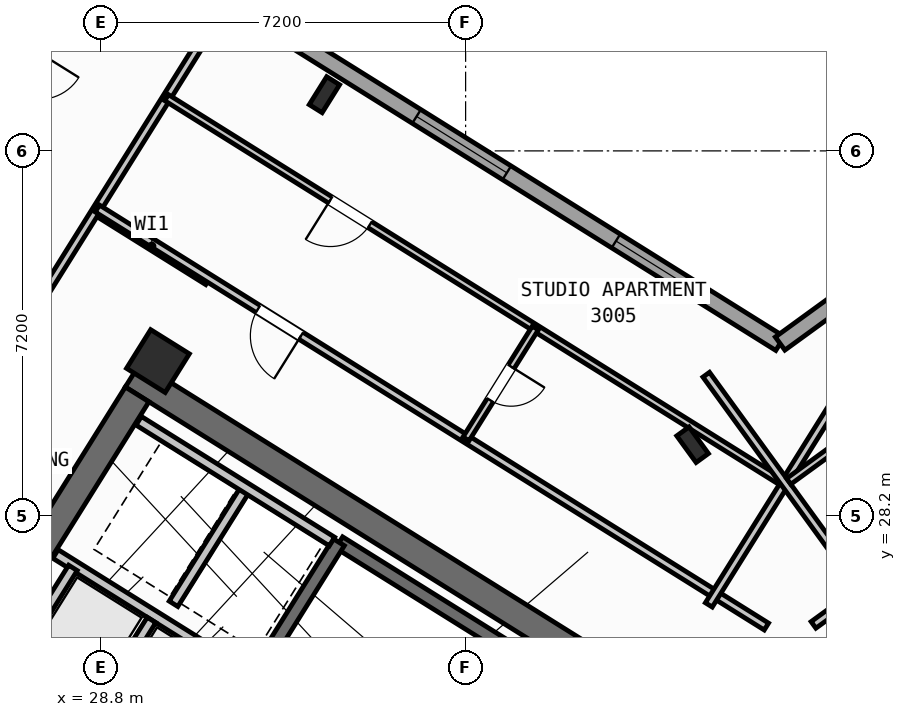
"""IFC4 building model, lengths in metres.
Left out: names, types, materials, properties, quantities, classifications, styles, units other than length and angle.
Written with IfcOpenShell. Run it as: python <this file> out.ifc"""

import sys

from ifc_helpers import new_model, si_unit, direction, frame, frame_2d, origin, origin_2d, place, context, subcontext, project, spatial, rectangle, hollow_rectangle, i_section, extrude, source, transform, mapped, element, fill, save


model = new_model("IFC4")
c1 = context("Model", 3, precision=1e-05, world=origin(), true_north=direction((0.0, 1.0)))
c2 = subcontext(c1, "Body", "Model", "MODEL_VIEW")
j1 = project(units=[si_unit("LENGTHUNIT", "METRE"), si_unit("PLANEANGLEUNIT", "RADIAN")], contexts=[c1])
p1 = place(None, origin())
s1 = spatial("IfcSite", under=j1, at=p1, CompositionType="ELEMENT")
p2 = place(p1, origin())
s2 = spatial("IfcBuilding", under=s1, at=p2, CompositionType="ELEMENT")
p3 = place(p2, frame((0.0, 0.0, 119.7)))
s3 = spatial("IfcBuildingStorey", under=s2, at=p3, CompositionType="ELEMENT", Elevation=119.7)
p4 = place(p3, frame((40.573, 24.01, 0.0), z_axis=(0.0, 0.0, 1.0), x_axis=(-0.848047359947, 0.529920442413, 0.0)))
e1 = element("IfcWall", 1, at=p4, inside=s3, PredefinedType="SHEAR", context=c2, shape_type="SweptSolid", body=[
    extrude(rectangle(XDim=13.14, YDim=0.55, at=frame_2d((6.57, 0.0))), origin(), (0.0, 0.0, 1.0), 3.35),
])
p5 = place(p3, frame((29.517, 30.594, 0.0), z_axis=(0.0, 0.0, 1.0), x_axis=(-0.529906864564, -0.848055844204, 0.0)))
e2 = element("IfcWall", 2, at=p5, inside=s3, PredefinedType="SHEAR", context=c2, shape_type="SweptSolid", body=[
    extrude(rectangle(XDim=3.575, YDim=0.55, at=frame_2d((1.788, 0.0))), origin(), (0.0, 0.0, 1.0), 3.35),
])
m1 = source(origin(), c2, "Body", "SweptSolid", [
    extrude(i_section(OverallWidth=0.3, OverallDepth=0.65, WebThickness=0.016, FlangeThickness=0.031, at=origin_2d()), origin(), (0.0, 0.0, 1.0), 3.6),
])
p6 = place(p3, frame((33.213, 36.509, 0.0), z_axis=(0.0, 0.0, 1.0), x_axis=(-0.848048096156, 0.529919264233, 0.0)))
e3 = element("IfcColumn", 3, at=p6, inside=s3, PredefinedType="COLUMN", context=c2, shape_type="MappedRepresentation", body=[
    mapped(m1, transform((0.0, 0.0, 0.0), scale=1.0)),
])
m2 = source(origin(), c2, "Body", "SweptSolid", [
    extrude(hollow_rectangle(XDim=0.9, YDim=0.9, WallThickness=0.036, at=origin_2d()), origin(), (0.0, 0.0, 1.0), 3.6),
])
p7 = place(p3, frame((29.928, 31.251, 0.0), z_axis=(0.0, 0.0, 1.0), x_axis=(-0.848048096156, 0.529919264233, 0.0)))
e4 = element("IfcColumn", 4, at=p7, inside=s3, PredefinedType="COLUMN", context=c2, shape_type="MappedRepresentation", body=[
    mapped(m2, transform((0.0, 0.0, 0.0), scale=1.0)),
])
p8 = place(p3, frame((40.479, 29.601, 0.0), z_axis=(0.0, 0.0, 1.0), x_axis=(0.809016994375, 0.587785252292, 0.0)))
e5 = element("IfcColumn", 5, at=p8, inside=s3, PredefinedType="COLUMN", context=c2, shape_type="MappedRepresentation", body=[
    mapped(m1, transform((0.0, 0.0, 0.0), scale=1.0)),
])
p9 = place(p3, frame((31.76, 12.183, 0.0), z_axis=(0.0, 0.0, 1.0), x_axis=(-0.848047074256, 0.529920899612, 0.0)))
e6 = element("IfcWall", 6, at=p9, inside=s3, PredefinedType="STANDARD", context=c2, shape_type="SweptSolid", body=[
    extrude(rectangle(XDim=30.652, YDim=0.32, at=frame_2d((15.326, 0.0))), origin(), (0.0, 0.0, 1.0), 3.35),
])
p10 = place(p9, frame((15.153, 0.0, 0.0)))
e7 = element("IfcOpeningElement", 7, at=p10, cuts=e6, PredefinedType="OPENING", context=c2, shape_type="SweptSolid", body=[
    extrude(rectangle(XDim=1.2, YDim=2.15, at=frame_2d((0.6, 1.075))), frame((0.0, 0.17, 0.0), z_axis=(0.0, -1.0, 0.0), x_axis=(1.0, 0.0, 0.0)), (0.0, 0.0, 1.0), 0.34),
])
p11 = place(p9, frame((2.002, 0.0, 0.8)))
e8 = element("IfcOpeningElement", 8, at=p11, cuts=e6, PredefinedType="OPENING", context=c2, shape_type="SweptSolid", body=[
    extrude(rectangle(XDim=2.1, YDim=1.55, at=frame_2d((1.05, 0.775))), frame((0.0, 0.17, 0.0), z_axis=(0.0, -1.0, 0.0), x_axis=(1.0, 0.0, 0.0)), (0.0, 0.0, 1.0), 0.34),
])
p12 = place(p9, frame((7.206, 0.0, 0.8)))
e9 = element("IfcOpeningElement", 9, at=p12, cuts=e6, PredefinedType="OPENING", context=c2, shape_type="SweptSolid", body=[
    extrude(rectangle(XDim=2.1, YDim=1.55, at=frame_2d((1.05, 0.775))), frame((0.0, 0.17, 0.0), z_axis=(0.0, -1.0, 0.0), x_axis=(1.0, 0.0, 0.0)), (0.0, 0.0, 1.0), 0.34),
])
p13 = place(p9, frame((12.648, 0.0, 1.0)))
e10 = element("IfcOpeningElement", 10, at=p13, cuts=e6, PredefinedType="OPENING", context=c2, shape_type="SweptSolid", body=[
    extrude(rectangle(XDim=0.9, YDim=1.25, at=frame_2d((0.45, 0.625))), frame((0.0, 0.17, 0.0), z_axis=(0.0, -1.0, 0.0), x_axis=(1.0, 0.0, 0.0)), (0.0, 0.0, 1.0), 0.34),
])
p14 = place(p9, frame((19.458, 0.0, 0.95)))
e11 = element("IfcOpeningElement", 11, at=p14, cuts=e6, PredefinedType="OPENING", context=c2, shape_type="SweptSolid", body=[
    extrude(rectangle(XDim=1.2, YDim=1.4, at=frame_2d((0.6, 0.7))), frame((0.0, 0.17, 0.0), z_axis=(0.0, -1.0, 0.0), x_axis=(1.0, 0.0, 0.0)), (0.0, 0.0, 1.0), 0.34),
])
p15 = place(p9, frame((21.858, 0.0, 0.95)))
e12 = element("IfcOpeningElement", 12, at=p15, cuts=e6, PredefinedType="OPENING", context=c2, shape_type="SweptSolid", body=[
    extrude(rectangle(XDim=1.2, YDim=1.4, at=frame_2d((0.6, 0.7))), frame((0.0, 0.17, 0.0), z_axis=(0.0, -1.0, 0.0), x_axis=(1.0, 0.0, 0.0)), (0.0, 0.0, 1.0), 0.34),
])
p16 = place(p9, frame((27.266, 0.0, 0.8)))
e13 = element("IfcOpeningElement", 13, at=p16, cuts=e6, PredefinedType="OPENING", context=c2, shape_type="SweptSolid", body=[
    extrude(rectangle(XDim=2.1, YDim=1.55, at=frame_2d((1.05, 0.775))), frame((0.0, 0.17, 0.0), z_axis=(0.0, -1.0, 0.0), x_axis=(1.0, 0.0, 0.0)), (0.0, 0.0, 1.0), 0.34),
])
p17 = place(p3, frame((17.424, 47.083, 0.0), z_axis=(0.0, 0.0, 1.0), x_axis=(0.848049927979, -0.529916332693, 0.0)))
e14 = element("IfcWall", 14, at=p17, inside=s3, PredefinedType="STANDARD", context=c2, shape_type="SweptSolid", body=[
    extrude(rectangle(XDim=29.223, YDim=0.32, at=frame_2d((14.612, 0.0))), origin(), (0.0, 0.0, 1.0), 3.35),
])
p18 = place(p17, frame((8.839, 0.0, 0.0)))
e15 = element("IfcOpeningElement", 15, at=p18, cuts=e14, PredefinedType="OPENING", context=c2, shape_type="SweptSolid", body=[
    extrude(rectangle(XDim=1.05, YDim=2.15, at=frame_2d((0.525, 1.075))), frame((0.0, 0.17, 0.0), z_axis=(0.0, -1.0, 0.0), x_axis=(1.0, 0.0, 0.0)), (0.0, 0.0, 1.0), 0.34),
])
p19 = place(p17, frame((0.719, 0.0, 0.85)))
e16 = element("IfcOpeningElement", 16, at=p19, cuts=e14, PredefinedType="OPENING", context=c2, shape_type="SweptSolid", body=[
    extrude(rectangle(XDim=1.8, YDim=1.5, at=frame_2d((0.9, 0.75))), frame((0.0, 0.17, 0.0), z_axis=(0.0, -1.0, 0.0), x_axis=(1.0, 0.0, 0.0)), (0.0, 0.0, 1.0), 0.34),
])
p20 = place(p17, frame((3.981, 0.0, 0.85)))
e17 = element("IfcOpeningElement", 17, at=p20, cuts=e14, PredefinedType="OPENING", context=c2, shape_type="SweptSolid", body=[
    extrude(rectangle(XDim=1.5, YDim=1.5, at=frame_2d((0.75, 0.75))), frame((0.0, 0.17, 0.0), z_axis=(0.0, -1.0, 0.0), x_axis=(1.0, 0.0, 0.0)), (0.0, 0.0, 1.0), 0.34),
])
p21 = place(p17, frame((7.021, 0.0, 0.95)))
e18 = element("IfcOpeningElement", 18, at=p21, cuts=e14, PredefinedType="OPENING", context=c2, shape_type="SweptSolid", body=[
    extrude(rectangle(XDim=1.2, YDim=1.4, at=frame_2d((0.6, 0.7))), frame((0.0, 0.17, 0.0), z_axis=(0.0, -1.0, 0.0), x_axis=(1.0, 0.0, 0.0)), (0.0, 0.0, 1.0), 0.34),
])
p22 = place(p17, frame((14.471, 0.0, 0.95)))
e19 = element("IfcOpeningElement", 19, at=p22, cuts=e14, PredefinedType="OPENING", context=c2, shape_type="SweptSolid", body=[
    extrude(rectangle(XDim=1.2, YDim=1.4, at=frame_2d((0.6, 0.7))), frame((0.0, 0.17, 0.0), z_axis=(0.0, -1.0, 0.0), x_axis=(1.0, 0.0, 0.0)), (0.0, 0.0, 1.0), 0.34),
])
p23 = place(p17, frame((17.254, 0.0, 1.0)))
e20 = element("IfcOpeningElement", 20, at=p23, cuts=e14, PredefinedType="OPENING", context=c2, shape_type="SweptSolid", body=[
    extrude(rectangle(XDim=0.9, YDim=1.25, at=frame_2d((0.45, 0.625))), frame((0.0, 0.17, 0.0), z_axis=(0.0, -1.0, 0.0), x_axis=(1.0, 0.0, 0.0)), (0.0, 0.0, 1.0), 0.34),
])
p24 = place(p17, frame((20.764, 0.0, 0.8)))
e21 = element("IfcOpeningElement", 21, at=p24, cuts=e14, PredefinedType="OPENING", context=c2, shape_type="SweptSolid", body=[
    extrude(rectangle(XDim=2.1, YDim=1.55, at=frame_2d((1.05, 0.775))), frame((0.0, 0.17, 0.0), z_axis=(0.0, -1.0, 0.0), x_axis=(1.0, 0.0, 0.0)), (0.0, 0.0, 1.0), 0.34),
])
p25 = place(p17, frame((25.403, 0.0, 0.8)))
e22 = element("IfcOpeningElement", 22, at=p25, cuts=e14, PredefinedType="OPENING", context=c2, shape_type="SweptSolid", body=[
    extrude(rectangle(XDim=2.1, YDim=1.55, at=frame_2d((1.05, 0.775))), frame((0.0, 0.17, 0.0), z_axis=(0.0, -1.0, 0.0), x_axis=(1.0, 0.0, 0.0)), (0.0, 0.0, 1.0), 0.34),
])
p26 = place(p3, frame((42.207, 31.597, 0.0), z_axis=(0.0, 0.0, 1.0), x_axis=(0.809020333377, 0.587780656523, 0.0)))
e23 = element("IfcWall", 23, at=p26, inside=s3, PredefinedType="STANDARD", context=c2, shape_type="SweptSolid", body=[
    extrude(rectangle(XDim=15.223, YDim=0.32, at=frame_2d((7.611, 0.0))), origin(), (0.0, 0.0, 1.0), 3.35),
])
p27 = place(p26, frame((12.82, 0.0, 0.0)))
e24 = element("IfcOpeningElement", 24, at=p27, cuts=e23, PredefinedType="OPENING", context=c2, shape_type="SweptSolid", body=[
    extrude(rectangle(XDim=1.05, YDim=2.15, at=frame_2d((0.525, 1.075))), frame((0.0, 0.17, 0.0), z_axis=(0.0, -1.0, 0.0), x_axis=(1.0, 0.0, 0.0)), (0.0, 0.0, 1.0), 0.34),
])
p28 = place(p26, frame((1.52, 0.0, 0.8)))
e25 = element("IfcOpeningElement", 25, at=p28, cuts=e23, PredefinedType="OPENING", context=c2, shape_type="SweptSolid", body=[
    extrude(rectangle(XDim=2.1, YDim=1.55, at=frame_2d((1.05, 0.775))), frame((0.0, 0.17, 0.0), z_axis=(0.0, -1.0, 0.0), x_axis=(1.0, 0.0, 0.0)), (0.0, 0.0, 1.0), 0.34),
])
p29 = place(p26, frame((5.76, 0.0, 0.8)))
e26 = element("IfcOpeningElement", 26, at=p29, cuts=e23, PredefinedType="OPENING", context=c2, shape_type="SweptSolid", body=[
    extrude(rectangle(XDim=2.1, YDim=1.55, at=frame_2d((1.05, 0.775))), frame((0.0, 0.17, 0.0), z_axis=(0.0, -1.0, 0.0), x_axis=(1.0, 0.0, 0.0)), (0.0, 0.0, 1.0), 0.34),
])
p30 = place(p26, frame((10.219, 0.0, 1.0)))
e27 = element("IfcOpeningElement", 27, at=p30, cuts=e23, PredefinedType="OPENING", context=c2, shape_type="SweptSolid", body=[
    extrude(rectangle(XDim=0.9, YDim=1.25, at=frame_2d((0.45, 0.625))), frame((0.0, 0.17, 0.0), z_axis=(0.0, -1.0, 0.0), x_axis=(1.0, 0.0, 0.0)), (0.0, 0.0, 1.0), 0.34),
])
p31 = place(p3, frame((39.721, 23.788, 0.0), z_axis=(0.0, 0.0, 1.0), x_axis=(-0.848054434086, 0.529909121291, 0.0)))
e28 = element("IfcWall", 28, at=p31, inside=s3, PredefinedType="SHEAR", context=c2, shape_type="SweptSolid", body=[
    extrude(rectangle(XDim=7.33, YDim=0.26, at=frame_2d((3.665, 0.0))), origin(), (0.0, 0.0, 1.0), 3.35),
])
p32 = place(p3, frame((33.496, 27.677, 0.0), z_axis=(0.0, 0.0, 1.0), x_axis=(-0.529908658664, -0.84805472316, 0.0)))
e29 = element("IfcWall", 29, at=p32, inside=s3, PredefinedType="SHEAR", context=c2, shape_type="SweptSolid", body=[
    extrude(rectangle(XDim=3.16, YDim=0.26, at=frame_2d((1.58, 0.0))), origin(), (0.0, 0.0, 1.0), 3.35),
])
p33 = place(p3, frame((31.822, 24.998, 0.0), z_axis=(0.0, 0.0, 1.0), x_axis=(-0.848036912365, 0.52993716162, 0.0)))
e30 = element("IfcWall", 30, at=p33, inside=s3, PredefinedType="STANDARD", context=c2, shape_type="SweptSolid", body=[
    extrude(rectangle(XDim=4.618, YDim=0.2, at=frame_2d((2.309, 0.0))), origin(), (0.0, 0.0, 1.0), 3.34),
])
p34 = place(p3, frame((32.108, 22.814, 0.0), z_axis=(0.0, 0.0, 1.0), x_axis=(-0.848042229521, 0.529928652696, 0.0)))
e31 = element("IfcWall", 31, at=p34, inside=s3, PredefinedType="STANDARD", context=c2, shape_type="SweptSolid", body=[
    extrude(rectangle(XDim=5.62, YDim=0.2, at=frame_2d((2.81, 0.0))), origin(), (0.0, 0.0, 1.0), 3.34),
])
p35 = place(p34, frame((0.39, 0.0, 0.0)))
e32 = element("IfcOpeningElement", 32, at=p35, cuts=e31, PredefinedType="OPENING", context=c2, shape_type="SweptSolid", body=[
    extrude(rectangle(XDim=1.1, YDim=2.15, at=frame_2d((0.55, 1.075))), frame((0.0, 0.11, 0.0), z_axis=(0.0, -1.0, 0.0), x_axis=(1.0, 0.0, 0.0)), (0.0, 0.0, 1.0), 0.22),
])
p36 = place(p34, frame((2.25, 0.0, 0.0)))
e33 = element("IfcOpeningElement", 33, at=p36, cuts=e31, PredefinedType="OPENING", context=c2, shape_type="SweptSolid", body=[
    extrude(rectangle(XDim=1.1, YDim=2.15, at=frame_2d((0.55, 1.075))), frame((0.0, 0.11, 0.0), z_axis=(0.0, -1.0, 0.0), x_axis=(1.0, 0.0, 0.0)), (0.0, 0.0, 1.0), 0.22),
])
p37 = place(p34, frame((4.11, 0.0, 0.0)))
e34 = element("IfcOpeningElement", 34, at=p37, cuts=e31, PredefinedType="OPENING", context=c2, shape_type="SweptSolid", body=[
    extrude(rectangle(XDim=1.1, YDim=2.15, at=frame_2d((0.55, 1.075))), frame((0.0, 0.11, 0.0), z_axis=(0.0, -1.0, 0.0), x_axis=(1.0, 0.0, 0.0)), (0.0, 0.0, 1.0), 0.22),
])
p38 = place(p3, frame((28.25, 27.17, 0.0), z_axis=(0.0, 0.0, 1.0), x_axis=(-0.529905827651, -0.848056492117, 0.0)))
e35 = element("IfcWall", 35, at=p38, inside=s3, PredefinedType="STANDARD", context=c2, shape_type="SweptSolid", body=[
    extrude(rectangle(XDim=1.65, YDim=0.2, at=frame_2d((0.825, 0.0))), origin(), (0.0, 0.0, 1.0), 3.34),
])
p39 = place(p3, frame((31.645, 28.716, 0.0), z_axis=(0.0, 0.0, 1.0), x_axis=(-0.52986693015, -0.848080795876, 0.0)))
e36 = element("IfcWall", 36, at=p39, inside=s3, PredefinedType="STANDARD", context=c2, shape_type="SweptSolid", body=[
    extrude(rectangle(XDim=2.66, YDim=0.2, at=frame_2d((1.33, 0.0))), origin(), (0.0, 0.0, 1.0), 3.34),
])
p40 = place(p3, frame((33.363, 27.69, 0.0), z_axis=(0.0, 0.0, 1.0), x_axis=(-0.848047090064, 0.529920874315, 0.0)))
e37 = element("IfcWall", 37, at=p40, inside=s3, PredefinedType="STANDARD", context=c2, shape_type="SweptSolid", body=[
    extrude(rectangle(XDim=4.498, YDim=0.2, at=frame_2d((2.249, 0.0))), origin(), (0.0, 0.0, 1.0), 3.34),
])
p41 = place(p3, frame((29.801, 26.142, 0.0), z_axis=(0.0, 0.0, 1.0), x_axis=(-0.529998940003, -0.847998304005, 0.0)))
e38 = element("IfcWall", 38, at=p41, inside=s3, PredefinedType="STANDARD", context=c2, shape_type="SweptSolid", body=[
    extrude(rectangle(XDim=1.58, YDim=0.2, at=frame_2d((0.79, 0.0))), origin(), (0.0, 0.0, 1.0), 3.34),
])
p42 = place(p3, frame((30.914, 32.829, 0.0), z_axis=(0.0, 0.0, 1.0), x_axis=(-0.848008813643, 0.529982124211, 0.0)))
e39 = element("IfcWall", 39, at=p42, inside=s3, PredefinedType="PARTITIONING", context=c2, shape_type="SweptSolid", body=[
    extrude(rectangle(XDim=2.61, YDim=0.16, at=frame_2d((1.305, 0.0))), origin(), (0.0, 0.0, 1.0), 3.34),
])
p43 = place(p3, frame((31.239, 38.274, 0.0), z_axis=(0.0, 0.0, 1.0), x_axis=(-0.529920220799, -0.848047498427, 0.0)))
e40 = element("IfcWall", 40, at=p43, inside=s3, PredefinedType="PARTITIONING", context=c2, shape_type="SweptSolid", body=[
    extrude(rectangle(XDim=9.2, YDim=0.16, at=frame_2d((4.6, 0.0))), origin(), (0.0, 0.0, 1.0), 3.34),
])
p44 = place(p3, frame((29.177, 39.881, 0.0), z_axis=(0.0, 0.0, 1.0), x_axis=(-0.529930649952, -0.848040981463, 0.0)))
e41 = element("IfcWall", 41, at=p44, inside=s3, PredefinedType="PARTITIONING", context=c2, shape_type="SweptSolid", body=[
    extrude(rectangle(XDim=7.07, YDim=0.11, at=frame_2d((3.535, 0.0))), origin(), (0.0, 0.0, 1.0), 3.34),
])
p45 = place(p44, frame((3.0, 0.0, 0.0)))
e42 = element("IfcOpeningElement", 42, at=p45, cuts=e41, PredefinedType="OPENING", context=c2, shape_type="SweptSolid", body=[
    extrude(rectangle(XDim=0.92, YDim=2.08, at=frame_2d((0.46, 1.04))), frame((0.0, 0.065, 0.0), z_axis=(0.0, -1.0, 0.0), x_axis=(1.0, 0.0, 0.0)), (0.0, 0.0, 1.0), 0.13),
])
p46 = place(p3, frame((41.936, 26.012, 0.0), z_axis=(0.0, 0.0, 1.0), x_axis=(-0.848051154596, 0.529914369676, 0.0)))
e43 = element("IfcWall", 43, at=p46, inside=s3, PredefinedType="PARTITIONING", context=c2, shape_type="SweptSolid", body=[
    extrude(rectangle(XDim=15.57, YDim=0.16, at=frame_2d((7.785, 0.0))), origin(), (0.0, 0.0, 1.0), 3.34),
])
p47 = place(p46, frame((10.83, 0.0, 0.0)))
e44 = element("IfcOpeningElement", 44, at=p47, cuts=e43, PredefinedType="OPENING", context=c2, shape_type="SweptSolid", body=[
    extrude(rectangle(XDim=1.0, YDim=2.1, at=frame_2d((0.5, 1.05))), frame((0.0, 0.09, 0.0), z_axis=(0.0, -1.0, 0.0), x_axis=(1.0, 0.0, 0.0)), (0.0, 0.0, 1.0), 0.18),
])
p48 = place(p3, frame((43.704, 31.086, 0.0), z_axis=(0.0, 0.0, 1.0), x_axis=(-0.529906828443, -0.848055866774, 0.0)))
e45 = element("IfcWall", 45, at=p48, inside=s3, PredefinedType="PARTITIONING", context=c2, shape_type="SweptSolid", body=[
    extrude(rectangle(XDim=5.48, YDim=0.16, at=frame_2d((2.74, 0.0))), origin(), (0.0, 0.0, 1.0), 3.34),
])
p49 = place(p3, frame((42.226, 28.873, 0.0), z_axis=(0.0, 0.0, 1.0), x_axis=(-0.848049134363, 0.529917602752, 0.0)))
e46 = element("IfcWall", 46, at=p49, inside=s3, PredefinedType="PLUMBINGWALL", context=c2, shape_type="SweptSolid", body=[
    extrude(rectangle(XDim=14.3, YDim=0.14, at=frame_2d((7.15, 0.0))), origin(), (0.0, 0.0, 1.0), 3.34),
])
p50 = place(p49, frame((9.57, 0.0, 0.0)))
e47 = element("IfcOpeningElement", 47, at=p50, cuts=e46, PredefinedType="OPENING", context=c2, shape_type="SweptSolid", body=[
    extrude(rectangle(XDim=0.92, YDim=2.08, at=frame_2d((0.46, 1.04))), frame((0.0, 0.08, 0.0), z_axis=(0.0, -1.0, 0.0), x_axis=(1.0, 0.0, 0.0)), (0.0, 0.0, 1.0), 0.16),
])
p51 = place(p3, frame((37.375, 31.904, 0.0), z_axis=(0.0, 0.0, 1.0), x_axis=(-0.529913878929, -0.848051461244, 0.0)))
e48 = element("IfcWall", 48, at=p51, inside=s3, PredefinedType="PLUMBINGWALL", context=c2, shape_type="SweptSolid", body=[
    extrude(rectangle(XDim=2.58, YDim=0.14, at=frame_2d((1.29, 0.0))), origin(), (0.0, 0.0, 1.0), 3.34),
])
p52 = place(p51, frame((0.9, 0.0, 0.0)))
e49 = element("IfcOpeningElement", 49, at=p52, cuts=e48, PredefinedType="OPENING", context=c2, shape_type="SweptSolid", body=[
    extrude(rectangle(XDim=0.78, YDim=2.05, at=frame_2d((0.39, 1.025))), frame((0.0, 0.08, 0.0), z_axis=(0.0, -1.0, 0.0), x_axis=(1.0, 0.0, 0.0)), (0.0, 0.0, 1.0), 0.16),
])
p53 = place(p3, frame((42.866, 26.044, 0.0), z_axis=(0.0, 0.0, 1.0), x_axis=(0.809020254154, 0.587780765566, 0.0)))
e50 = element("IfcWall", 50, at=p53, inside=s3, PredefinedType="PARTITIONING", context=c2, shape_type="SweptSolid", body=[
    extrude(rectangle(XDim=14.67, YDim=0.16, at=frame_2d((7.335, 0.0))), origin(), (0.0, 0.0, 1.0), 3.34),
])
p54 = place(p53, frame((10.2, 0.0, 0.0)))
e51 = element("IfcOpeningElement", 51, at=p54, cuts=e50, PredefinedType="OPENING", context=c2, shape_type="SweptSolid", body=[
    extrude(rectangle(XDim=1.0, YDim=2.1, at=frame_2d((0.5, 1.05))), frame((0.0, 0.09, 0.0), z_axis=(0.0, -1.0, 0.0), x_axis=(1.0, 0.0, 0.0)), (0.0, 0.0, 1.0), 0.18),
])
p55 = place(p3, frame((43.969, 26.55, 0.0), z_axis=(0.0, 0.0, 1.0), x_axis=(-0.587776919386, 0.80902304852, 0.0)))
e52 = element("IfcWall", 52, at=p55, inside=s3, PredefinedType="PARTITIONING", context=c2, shape_type="SweptSolid", body=[
    extrude(rectangle(XDim=5.48, YDim=0.16, at=frame_2d((2.74, 0.0))), origin(), (0.0, 0.0, 1.0), 3.34),
])
p56 = place(p3, frame((42.377, 28.878, 0.0), z_axis=(0.0, 0.0, 1.0), x_axis=(0.809020411523, 0.587780548963, 0.0)))
e53 = element("IfcWall", 53, at=p56, inside=s3, PredefinedType="PLUMBINGWALL", context=c2, shape_type="SweptSolid", body=[
    extrude(rectangle(XDim=13.4, YDim=0.14, at=frame_2d((6.7, 0.0))), origin(), (0.0, 0.0, 1.0), 3.34),
])
p57 = place(p56, frame((8.94, 0.0, 0.0)))
e54 = element("IfcOpeningElement", 54, at=p57, cuts=e53, PredefinedType="OPENING", context=c2, shape_type="SweptSolid", body=[
    extrude(rectangle(XDim=0.92, YDim=2.08, at=frame_2d((0.46, 1.04))), frame((0.0, 0.08, 0.0), z_axis=(0.0, -1.0, 0.0), x_axis=(1.0, 0.0, 0.0)), (0.0, 0.0, 1.0), 0.16),
])
m3 = source(origin(), c2, "Body", "SweptSolid", [
    extrude(rectangle(XDim=2.1, YDim=1.55, at=frame_2d((1.05, 0.775))), frame((0.0, 0.03, 0.0), z_axis=(0.0, -1.0, 0.0), x_axis=(1.0, 0.0, 0.0)), (0.0, 0.0, 1.0), 0.06),
])
p58 = place(p24, origin())
e55 = element("IfcWindow", 55, at=p58, inside=s3, PartitioningType="SINGLE_PANEL", PredefinedType="WINDOW", context=c2, shape_type="MappedRepresentation", body=[
    mapped(m3, transform((0.0, 0.0, 0.0), scale=1.0)),
])
fill(e21, e55)
p59 = place(p25, origin())
e56 = element("IfcWindow", 56, at=p59, inside=s3, PartitioningType="SINGLE_PANEL", PredefinedType="WINDOW", context=c2, shape_type="MappedRepresentation", body=[
    mapped(m3, transform((0.0, 0.0, 0.0), scale=1.0)),
])
fill(e22, e56)
m4 = source(origin(), c2, "Body", "SweptSolid", [
    extrude(rectangle(XDim=1.0, YDim=2.1, at=frame_2d((0.5, 1.05))), frame((0.0, 0.025, 0.0), z_axis=(0.0, -1.0, 0.0), x_axis=(1.0, 0.0, 0.0)), (0.0, 0.0, 1.0), 0.05),
])
p60 = place(p47, origin())
e57 = element("IfcDoor", 57, at=p60, inside=s3, OperationType="SINGLE_SWING_LEFT", PredefinedType="DOOR", context=c2, shape_type="MappedRepresentation", body=[
    mapped(m4, transform((0.0, 0.0, 0.0), scale=1.0)),
])
fill(e44, e57)
m5 = source(origin(), c2, "Body", "SweptSolid", [
    extrude(rectangle(XDim=0.92, YDim=2.08, at=frame_2d((0.46, 1.04))), frame((0.0, 0.025, 0.0), z_axis=(0.0, -1.0, 0.0), x_axis=(1.0, 0.0, 0.0)), (0.0, 0.0, 1.0), 0.05),
])
p61 = place(p50, origin())
e58 = element("IfcDoor", 58, at=p61, inside=s3, OperationType="SINGLE_SWING_RIGHT", PredefinedType="DOOR", context=c2, shape_type="MappedRepresentation", body=[
    mapped(m5, transform((0.0, 0.0, 0.0), scale=1.0)),
])
fill(e47, e58)
m6 = source(origin(), c2, "Body", "SweptSolid", [
    extrude(rectangle(XDim=0.78, YDim=2.05, at=frame_2d((0.39, 1.025))), frame((0.0, 0.025, 0.0), z_axis=(0.0, -1.0, 0.0), x_axis=(1.0, 0.0, 0.0)), (0.0, 0.0, 1.0), 0.05),
])
p62 = place(p52, origin())
e59 = element("IfcDoor", 59, at=p62, inside=s3, OperationType="SINGLE_SWING_LEFT", PredefinedType="DOOR", context=c2, shape_type="MappedRepresentation", body=[
    mapped(m6, transform((0.0, 0.0, 0.0), scale=1.0)),
])
fill(e49, e59)
save(model, sys.argv[1])
